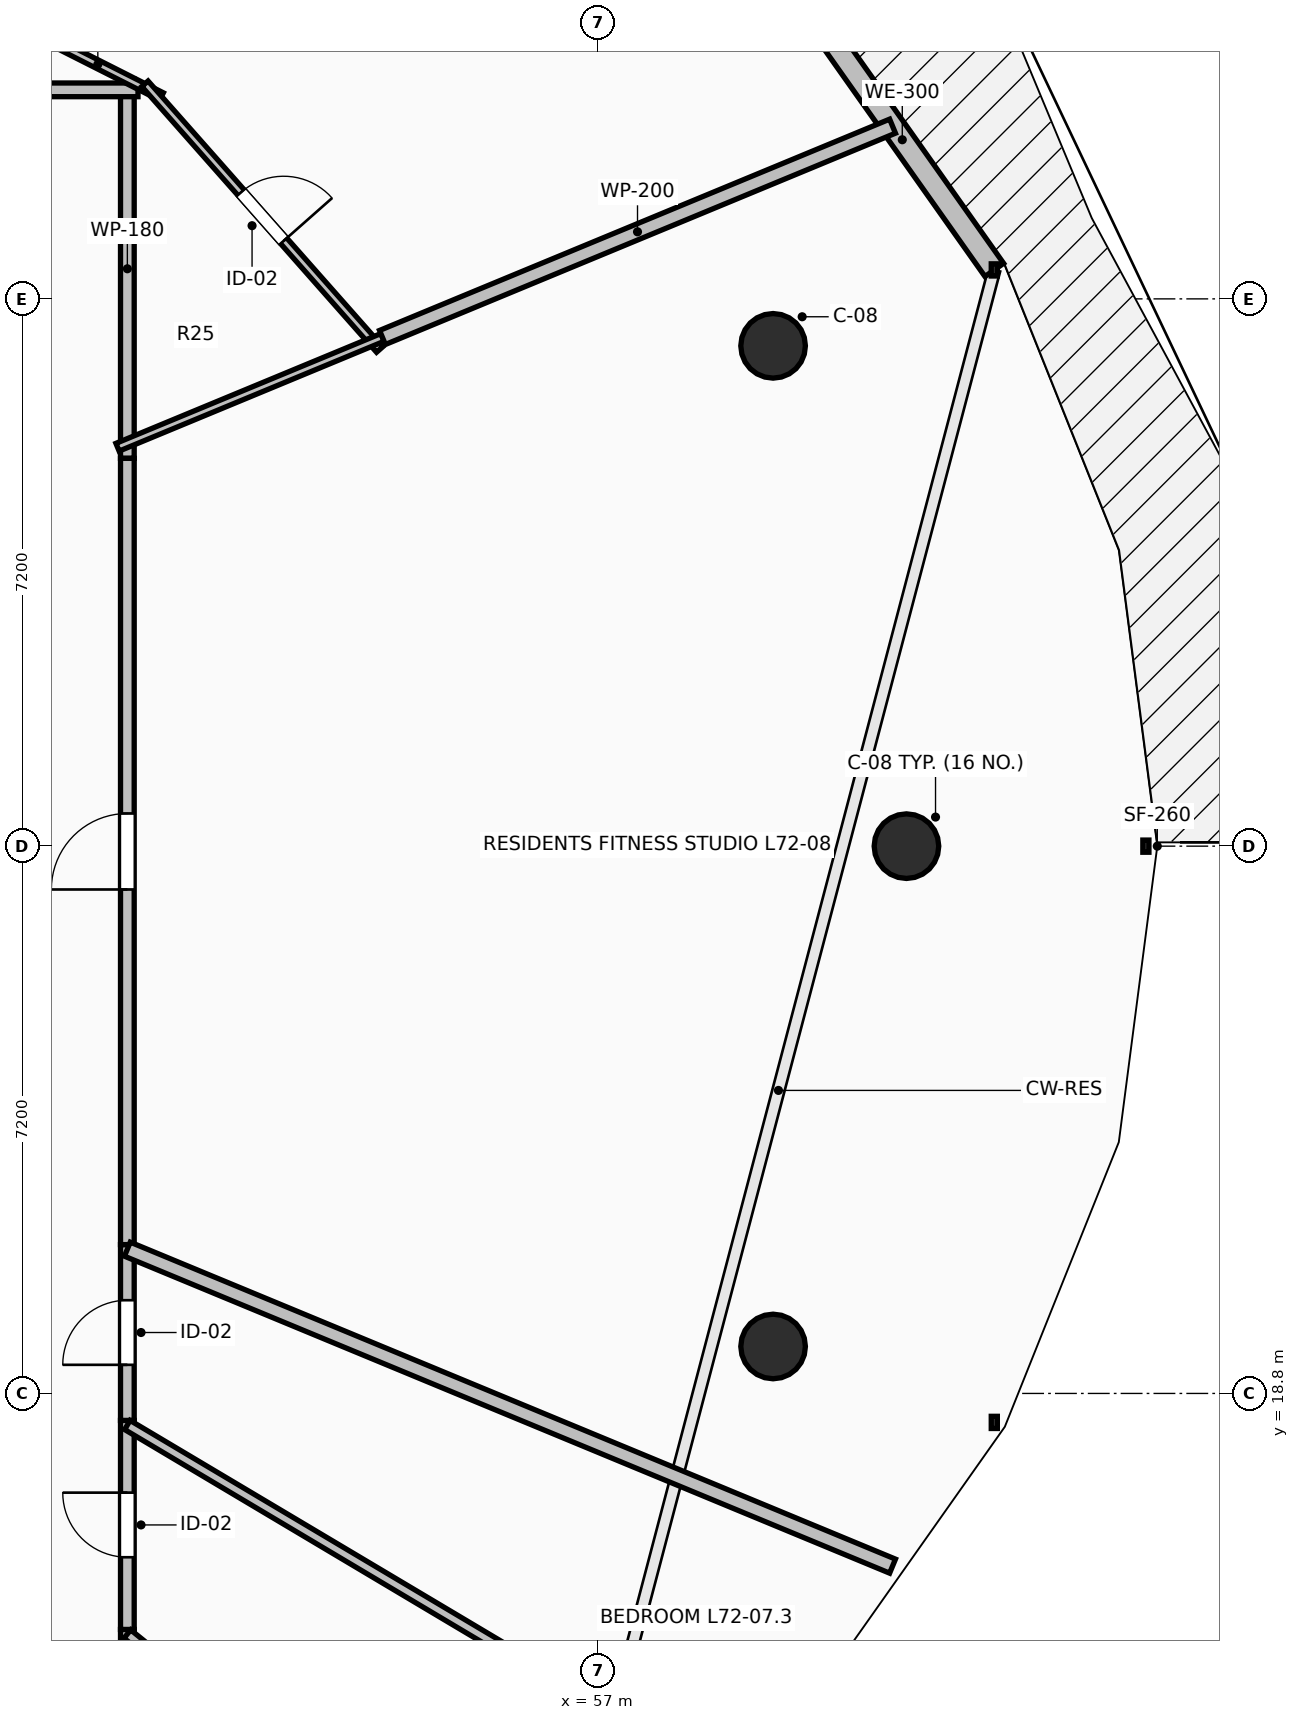
"""IFC4 building model, lengths in metres.
Left out: names, types, materials, properties, quantities, classifications, styles, units other than length and angle.
Written with IfcOpenShell. Run it as: python <this file> out.ifc"""

import sys

from ifc_helpers import new_model, si_unit, direction, frame, frame_2d, origin, origin_2d, place, context, subcontext, project, spatial, rectangle, circle, extrude, element, fill, save


model = new_model("IFC4")
c1 = context("Model", 3, precision=1e-05, world=origin(), true_north=direction((0.0, 1.0)))
c2 = subcontext(c1, "Body", "Model", "MODEL_VIEW")
j1 = project(units=[si_unit("LENGTHUNIT", "METRE"), si_unit("PLANEANGLEUNIT", "RADIAN")], contexts=[c1])
p1 = place(None, origin())
s1 = spatial("IfcSite", under=j1, at=p1, CompositionType="ELEMENT")
p2 = place(p1, origin())
s2 = spatial("IfcBuilding", under=s1, at=p2, CompositionType="ELEMENT")
p3 = place(p2, frame((0.0, 0.0, 266.2)))
s3 = spatial("IfcBuildingStorey", under=s2, at=p3, CompositionType="ELEMENT", Elevation=266.2)
for number, where, z_axis, x_axis in (
    (1, (61.05, 26.0, 0.0), (0.0, 0.0, 1.0), (1.0, 0.0, 0.0)),
    (2, (59.295, 32.582, 0.0), (0.0, 0.0, 1.0), (0.924, 0.383, 0.0)),
    (3, (59.295, 19.418, 0.0), (0.0, 0.0, 1.0), (0.924, -0.383, 0.0)),
):
    element("IfcColumn", number, at=place(p3, frame(where, z_axis=z_axis, x_axis=x_axis)), inside=s3, PredefinedType="COLUMN", context=c2, shape_type="SweptSolid", body=[
        extrude(circle(Radius=0.425, at=origin_2d()), origin(), (0.0, 0.0, 1.0), 3.55),
    ])
p4 = place(p3, frame((62.206, 33.581, 0.0), z_axis=(0.0, 0.0, 1.0), x_axis=(-0.577261247247, 0.816559521668, 0.0)))
e4 = element("IfcWall", 4, at=p4, inside=s3, PredefinedType="STANDARD", context=c2, shape_type="SweptSolid", body=[
    extrude(rectangle(XDim=4.194, YDim=0.3, at=frame_2d((2.097, 0.0))), origin(), (0.0, 0.0, 1.0), 3.29),
])
p5 = place(p3, frame((50.8, 31.102, 0.0), z_axis=(0.0, 0.0, 1.0), x_axis=(0.0, 1.0, 0.0)))
e5 = element("IfcWall", 5, at=p5, inside=s3, PredefinedType="PARTITIONING", context=c2, shape_type="SweptSolid", body=[
    extrude(rectangle(XDim=4.988, YDim=0.18, at=frame_2d((2.494, 0.0))), origin(), (0.0, 0.0, 1.0), 2.482),
])
p6 = place(p3, frame((50.94, 35.95, 0.0), z_axis=(0.0, 0.0, 1.0), x_axis=(-1.0, 0.0, 0.0)))
e6 = element("IfcWall", 6, at=p6, inside=s3, PredefinedType="PARTITIONING", context=c2, shape_type="SweptSolid", body=[
    extrude(rectangle(XDim=2.056, YDim=0.18, at=frame_2d((1.028, 0.0))), origin(), (0.0, 0.0, 1.0), 2.979),
])
p7 = place(p3, frame((50.8, 14.05, 0.0), z_axis=(0.0, 0.0, 1.0), x_axis=(0.0, 1.0, 0.0)))
e7 = element("IfcWall", 7, at=p7, inside=s3, PredefinedType="PARTITIONING", context=c2, shape_type="SweptSolid", body=[
    extrude(rectangle(XDim=1.645, YDim=0.18, at=frame_2d((0.823, 0.0))), origin(), (0.0, 0.0, 1.0), 2.482),
])
p8 = place(p3, frame((50.8, 15.695, 0.0), z_axis=(0.0, 0.0, 1.0), x_axis=(0.0, 1.0, 0.0)))
e8 = element("IfcWall", 8, at=p8, inside=s3, PredefinedType="PARTITIONING", context=c2, shape_type="SweptSolid", body=[
    extrude(rectangle(XDim=2.75, YDim=0.18, at=frame_2d((1.375, 0.0))), origin(), (0.0, 0.0, 1.0), 2.482),
])
p9 = place(p8, frame((0.95, 0.0, 0.0)))
e9 = element("IfcOpeningElement", 9, at=p9, cuts=e8, PredefinedType="OPENING", context=c2, shape_type="SweptSolid", body=[
    extrude(rectangle(XDim=0.85, YDim=2.1, at=frame_2d((0.425, 1.05))), frame((0.0, 0.105, 0.0), z_axis=(0.0, -1.0, 0.0), x_axis=(1.0, 0.0, 0.0)), (0.0, 0.0, 1.0), 0.21),
])
p10 = place(p3, frame((50.8, 18.445, 0.0), z_axis=(0.0, 0.0, 1.0), x_axis=(0.0, 1.0, 0.0)))
e10 = element("IfcWall", 10, at=p10, inside=s3, PredefinedType="PARTITIONING", context=c2, shape_type="SweptSolid", body=[
    extrude(rectangle(XDim=2.313, YDim=0.18, at=frame_2d((1.156, 0.0))), origin(), (0.0, 0.0, 1.0), 3.29),
])
p11 = place(p10, frame((0.731, 0.0, 0.0)))
e11 = element("IfcOpeningElement", 11, at=p11, cuts=e10, PredefinedType="OPENING", context=c2, shape_type="SweptSolid", body=[
    extrude(rectangle(XDim=0.85, YDim=2.1, at=frame_2d((0.425, 1.05))), frame((0.0, 0.105, 0.0), z_axis=(0.0, -1.0, 0.0), x_axis=(1.0, 0.0, 0.0)), (0.0, 0.0, 1.0), 0.21),
])
p12 = place(p3, frame((50.8, 20.758, 0.0), z_axis=(0.0, 0.0, 1.0), x_axis=(0.0, 1.0, 0.0)))
e12 = element("IfcWall", 12, at=p12, inside=s3, PredefinedType="PARTITIONING", context=c2, shape_type="SweptSolid", body=[
    extrude(rectangle(XDim=10.344, YDim=0.18, at=frame_2d((5.172, 0.0))), origin(), (0.0, 0.0, 1.0), 2.482),
])
p13 = place(p12, frame((4.672, 0.0, 0.0)))
e13 = element("IfcOpeningElement", 13, at=p13, cuts=e12, PredefinedType="OPENING", context=c2, shape_type="SweptSolid", body=[
    extrude(rectangle(XDim=1.0, YDim=2.15, at=frame_2d((0.5, 1.075))), frame((0.0, 0.105, 0.0), z_axis=(0.0, -1.0, 0.0), x_axis=(1.0, 0.0, 0.0)), (0.0, 0.0, 1.0), 0.21),
])
p14 = place(p3, frame((48.831, 35.856, 0.0), z_axis=(0.0, 0.0, 1.0), x_axis=(0.739696022243, 0.672941152463, 0.0)))
e14 = element("IfcWall", 14, at=p14, inside=s3, PredefinedType="PARTITIONING", context=c2, shape_type="SweptSolid", body=[
    extrude(rectangle(XDim=1.313, YDim=0.11, at=frame_2d((0.656, 0.0))), origin(), (0.0, 0.0, 1.0), 2.979),
])
p15 = place(p3, frame((49.574, 36.708, 0.0), z_axis=(0.0, 0.0, 1.0), x_axis=(0.8925722309, -0.450904438464, 0.0)))
e15 = element("IfcWall", 15, at=p15, inside=s3, PredefinedType="PARTITIONING", context=c2, shape_type="SweptSolid", body=[
    extrude(rectangle(XDim=1.877, YDim=0.11, at=frame_2d((0.938, 0.0))), origin(), (0.0, 0.0, 1.0), 3.29),
])
p16 = place(p3, frame((51.031, 36.03, 0.0), z_axis=(0.0, 0.0, 1.0), x_axis=(0.662106207726, -0.749410014405, 0.0)))
e16 = element("IfcWall", 16, at=p16, inside=s3, PredefinedType="PARTITIONING", context=c2, shape_type="SweptSolid", body=[
    extrude(rectangle(XDim=4.665, YDim=0.11, at=frame_2d((2.332, 0.0))), origin(), (0.0, 0.0, 1.0), 2.482),
])
p17 = place(p16, frame((1.907, 0.0, 0.0)))
e17 = element("IfcOpeningElement", 17, at=p17, cuts=e16, PredefinedType="OPENING", context=c2, shape_type="SweptSolid", body=[
    extrude(rectangle(XDim=0.85, YDim=2.1, at=frame_2d((0.425, 1.05))), frame((0.0, 0.07, 0.0), z_axis=(0.0, -1.0, 0.0), x_axis=(1.0, 0.0, 0.0)), (0.0, 0.0, 1.0), 0.14),
])
p18 = place(p3, frame((54.156, 32.693, 0.0), z_axis=(0.0, 0.0, 1.0), x_axis=(-0.923827524065, -0.382808967736, 0.0)))
e18 = element("IfcWall", 18, at=p18, inside=s3, PredefinedType="PARTITIONING", context=c2, shape_type="SweptSolid", body=[
    extrude(rectangle(XDim=3.773, YDim=0.11, at=frame_2d((1.886, 0.0))), origin(), (0.0, 0.0, 1.0), 2.482),
])
p19 = place(p3, frame((54.156, 32.692, 0.0), z_axis=(0.0, 0.0, 1.0), x_axis=(0.923880411625, 0.382681309989, 0.0)))
e19 = element("IfcWall", 19, at=p19, inside=s3, PredefinedType="PARTITIONING", context=c2, shape_type="SweptSolid", body=[
    extrude(rectangle(XDim=7.263, YDim=0.2, at=frame_2d((3.632, 0.0))), origin(), (0.0, 0.0, 1.0), 2.482),
])
p20 = place(p3, frame((55.828, 11.563, 0.0), z_axis=(0.0, 0.0, 1.0), x_axis=(-0.777103372697, 0.62937298015, 0.0)))
e20 = element("IfcWall", 20, at=p20, inside=s3, PredefinedType="PARTITIONING", context=c2, shape_type="SweptSolid", body=[
    extrude(rectangle(XDim=6.47, YDim=0.14, at=frame_2d((3.235, 0.0))), origin(), (0.0, 0.0, 1.0), 2.482),
])
p21 = place(p3, frame((58.493, 13.808, 0.0), z_axis=(0.0, 0.0, 1.0), x_axis=(-0.859400180079, 0.511303560011, 0.0)))
e21 = element("IfcWall", 21, at=p21, inside=s3, PredefinedType="PARTITIONING", context=c2, shape_type="SweptSolid", body=[
    extrude(rectangle(XDim=8.951, YDim=0.14, at=frame_2d((4.476, 0.0))), origin(), (0.0, 0.0, 1.0), 2.874),
])
p22 = place(p3, frame((60.867, 16.528, 0.0), z_axis=(0.0, 0.0, 1.0), x_axis=(-0.923877013663, 0.382689513347, 0.0)))
e22 = element("IfcWall", 22, at=p22, inside=s3, PredefinedType="PARTITIONING", context=c2, shape_type="SweptSolid", body=[
    extrude(rectangle(XDim=10.896, YDim=0.2, at=frame_2d((5.448, 0.0))), origin(), (0.0, 0.0, 1.0), 2.874),
])
p23 = place(p13, origin())
e23 = element("IfcDoor", 23, at=p23, inside=s3, OperationType="SINGLE_SWING_LEFT", PredefinedType="DOOR", context=c2, shape_type="SweptSolid", body=[
    extrude(rectangle(XDim=1.0, YDim=2.15, at=frame_2d((0.5, 1.075))), frame((0.0, 0.025, 0.0), z_axis=(0.0, -1.0, 0.0), x_axis=(1.0, 0.0, 0.0)), (0.0, 0.0, 1.0), 0.05),
])
fill(e13, e23)
p24 = place(p17, origin())
e24 = element("IfcDoor", 24, at=p24, inside=s3, OperationType="SINGLE_SWING_RIGHT", PredefinedType="DOOR", context=c2, shape_type="SweptSolid", body=[
    extrude(rectangle(XDim=0.85, YDim=2.1, at=frame_2d((0.425, 1.05))), frame((0.0, 0.025, 0.0), z_axis=(0.0, -1.0, 0.0), x_axis=(1.0, 0.0, 0.0)), (0.0, 0.0, 1.0), 0.05),
])
fill(e17, e24)
p25 = place(p9, origin())
e25 = element("IfcDoor", 25, at=p25, inside=s3, OperationType="SINGLE_SWING_RIGHT", PredefinedType="DOOR", context=c2, shape_type="SweptSolid", body=[
    extrude(rectangle(XDim=0.85, YDim=2.1, at=frame_2d((0.425, 1.05))), frame((0.0, 0.025, 0.0), z_axis=(0.0, -1.0, 0.0), x_axis=(1.0, 0.0, 0.0)), (0.0, 0.0, 1.0), 0.05),
])
fill(e9, e25)
p26 = place(p11, origin())
e26 = element("IfcDoor", 26, at=p26, inside=s3, OperationType="SINGLE_SWING_LEFT", PredefinedType="DOOR", context=c2, shape_type="SweptSolid", body=[
    extrude(rectangle(XDim=0.85, YDim=2.1, at=frame_2d((0.425, 1.05))), frame((0.0, 0.025, 0.0), z_axis=(0.0, -1.0, 0.0), x_axis=(1.0, 0.0, 0.0)), (0.0, 0.0, 1.0), 0.05),
])
fill(e11, e26)
save(model, sys.argv[1])
